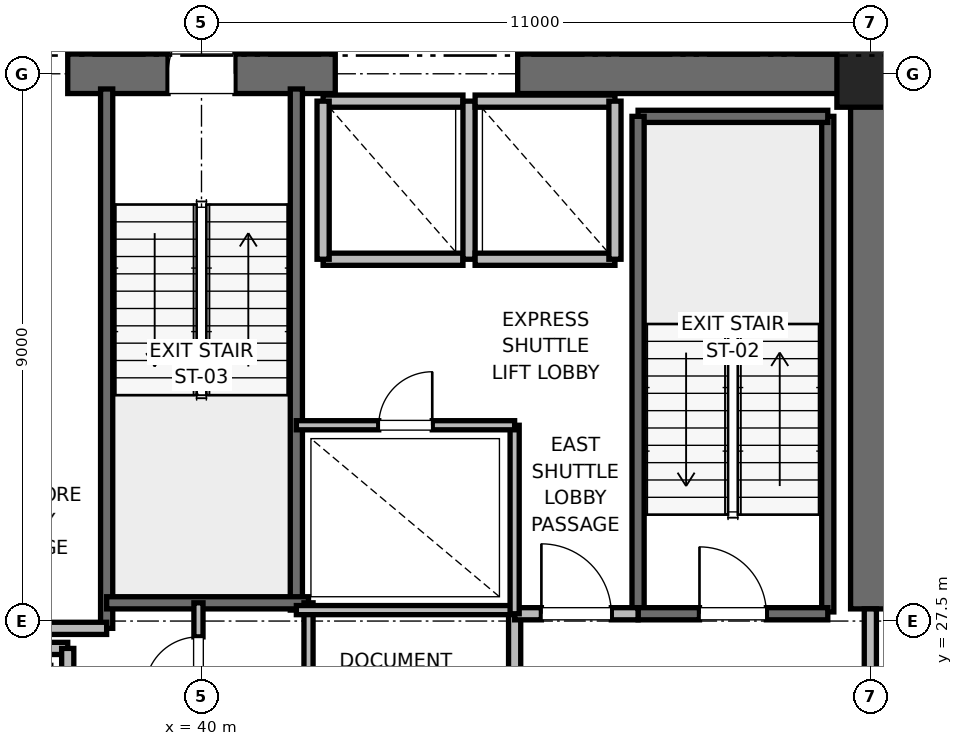
"""IFC4 building model, lengths in metres.
Left out: names, types, materials, properties, quantities, classifications, styles, units other than length and angle.
Written with IfcOpenShell. Run it as: python <this file> out.ifc"""

import sys

from ifc_helpers import new_model, si_unit, direction, frame, frame_2d, origin, origin_2d, place, context, subcontext, project, spatial, rectangle, extrude, element, fill, save


model = new_model("IFC4")
c1 = context("Model", 3, precision=1e-05, world=origin(), true_north=direction((0.0, 1.0)))
c2 = subcontext(c1, "Body", "Model", "MODEL_VIEW")
j1 = project(units=[si_unit("LENGTHUNIT", "METRE"), si_unit("PLANEANGLEUNIT", "RADIAN")], contexts=[c1])
p1 = place(None, origin())
s1 = spatial("IfcSite", under=j1, at=p1, CompositionType="ELEMENT")
p2 = place(p1, origin())
s2 = spatial("IfcBuilding", under=s1, at=p2, CompositionType="ELEMENT")
p3 = place(p2, frame((0.0, 0.0, 43.6)))
s3 = spatial("IfcBuildingStorey", under=s2, at=p3, CompositionType="ELEMENT", Elevation=43.6)
p4 = place(p3, frame((51.0, 36.5, 0.0), z_axis=(0.0, 0.0, 1.0), x_axis=(1.0, 0.0, 0.0)))
e1 = element("IfcColumn", 1, at=p4, inside=s3, PredefinedType="PILASTER", context=c2, shape_type="SweptSolid", body=[
    extrude(rectangle(XDim=1.1, YDim=1.1, at=origin_2d()), origin(), (0.0, 0.0, 1.0), 4.0),
])
p5 = place(p3, frame((37.8, 36.5, 0.0), z_axis=(0.0, 0.0, 1.0), x_axis=(1.0, 0.0, 0.0)))
e2 = element("IfcWall", 2, at=p5, inside=s3, PredefinedType="SHEAR", context=c2, shape_type="SweptSolid", body=[
    extrude(rectangle(XDim=4.4, YDim=0.65, at=frame_2d((2.2, 0.0))), origin(), (0.0, 0.0, 1.0), 3.76),
])
p6 = place(p5, frame((1.65, 0.0, 0.0)))
e3 = element("IfcOpeningElement", 3, at=p6, cuts=e2, PredefinedType="OPENING", context=c2, shape_type="SweptSolid", body=[
    extrude(rectangle(XDim=1.1, YDim=2.15, at=frame_2d((0.55, 1.075))), frame((0.0, 0.325, 0.0), z_axis=(0.0, -1.0, 0.0), x_axis=(1.0, 0.0, 0.0)), (0.0, 0.0, 1.0), 0.65),
])
p7 = place(p3, frame((45.2, 36.5, 0.0), z_axis=(0.0, 0.0, 1.0), x_axis=(1.0, 0.0, 0.0)))
e4 = element("IfcWall", 4, at=p7, inside=s3, PredefinedType="SHEAR", context=c2, shape_type="SweptSolid", body=[
    extrude(rectangle(XDim=5.8, YDim=0.65, at=frame_2d((2.9, 0.0))), origin(), (0.0, 0.0, 1.0), 3.76),
])
p8 = place(p3, frame((51.0, 27.7, 0.0), z_axis=(0.0, 0.0, 1.0), x_axis=(0.0, 1.0, 0.0)))
e5 = element("IfcWall", 5, at=p8, inside=s3, PredefinedType="SHEAR", context=c2, shape_type="SweptSolid", body=[
    extrude(rectangle(XDim=8.8, YDim=0.65, at=frame_2d((4.4, 0.0))), origin(), (0.0, 0.0, 1.0), 3.76),
])
p9 = place(p3, frame((50.3, 27.65, 0.0), z_axis=(0.0, 0.0, 1.0), x_axis=(0.0, 1.0, 0.0)))
e6 = element("IfcWall", 6, at=p9, inside=s3, PredefinedType="SOLIDWALL", context=c2, shape_type="SweptSolid", body=[
    extrude(rectangle(XDim=8.15, YDim=0.2, at=frame_2d((4.075, 0.0))), origin(), (0.0, 0.0, 1.0), 3.76),
])
p10 = place(p3, frame((47.18, 35.8, 0.0), z_axis=(0.0, 0.0, 1.0), x_axis=(1.0, 0.0, 0.0)))
e7 = element("IfcWall", 7, at=p10, inside=s3, PredefinedType="SOLIDWALL", context=c2, shape_type="SweptSolid", body=[
    extrude(rectangle(XDim=3.12, YDim=0.2, at=frame_2d((1.56, 0.0))), origin(), (0.0, 0.0, 1.0), 3.76),
])
p11 = place(p3, frame((47.18, 27.62, 0.0), z_axis=(0.0, 0.0, 1.0), x_axis=(0.0, 1.0, 0.0)))
e8 = element("IfcWall", 8, at=p11, inside=s3, PredefinedType="SOLIDWALL", context=c2, shape_type="SweptSolid", body=[
    extrude(rectangle(XDim=8.18, YDim=0.2, at=frame_2d((4.09, 0.0))), origin(), (0.0, 0.0, 1.0), 3.76),
])
p12 = place(p3, frame((47.18, 27.62, 0.0), z_axis=(0.0, 0.0, 1.0), x_axis=(1.0, 0.0, 0.0)))
e9 = element("IfcWall", 9, at=p12, inside=s3, PredefinedType="SOLIDWALL", context=c2, shape_type="SweptSolid", body=[
    extrude(rectangle(XDim=3.12, YDim=0.2, at=frame_2d((1.56, 0.0))), origin(), (0.0, 0.0, 1.0), 3.76),
])
p13 = place(p12, frame((1.01, 0.0, 0.0)))
e10 = element("IfcOpeningElement", 10, at=p13, cuts=e9, PredefinedType="OPENING", context=c2, shape_type="SweptSolid", body=[
    extrude(rectangle(XDim=1.1, YDim=2.15, at=frame_2d((0.55, 1.075))), frame((0.0, 0.1, 0.0), z_axis=(0.0, -1.0, 0.0), x_axis=(1.0, 0.0, 0.0)), (0.0, 0.0, 1.0), 0.2),
])
p14 = place(p3, frame((38.44, 27.38, 0.0), z_axis=(0.0, 0.0, 1.0), x_axis=(0.0, 1.0, 0.0)))
e11 = element("IfcWall", 11, at=p14, inside=s3, PredefinedType="SOLIDWALL", context=c2, shape_type="SweptSolid", body=[
    extrude(rectangle(XDim=8.87, YDim=0.2, at=frame_2d((4.435, 0.0))), origin(), (0.0, 0.0, 1.0), 3.76),
])
p15 = place(p3, frame((41.56, 27.68, 0.0), z_axis=(0.0, 0.0, 1.0), x_axis=(0.0, 1.0, 0.0)))
e12 = element("IfcWall", 12, at=p15, inside=s3, PredefinedType="SOLIDWALL", context=c2, shape_type="SweptSolid", body=[
    extrude(rectangle(XDim=8.57, YDim=0.2, at=frame_2d((4.285, 0.0))), origin(), (0.0, 0.0, 1.0), 3.76),
])
p16 = place(p3, frame((38.44, 27.8, 0.0), z_axis=(0.0, 0.0, 1.0), x_axis=(1.0, 0.0, 0.0)))
e13 = element("IfcWall", 13, at=p16, inside=s3, PredefinedType="SOLIDWALL", context=c2, shape_type="SweptSolid", body=[
    extrude(rectangle(XDim=3.32, YDim=0.2, at=frame_2d((1.66, 0.0))), origin(), (0.0, 0.0, 1.0), 3.76),
])
p17 = place(p3, frame((32.82, 27.38, 0.0), z_axis=(0.0, 0.0, 1.0), x_axis=(1.0, 0.0, 0.0)))
e14 = element("IfcWall", 14, at=p17, inside=s3, PredefinedType="PARTITIONING", context=c2, shape_type="SweptSolid", body=[
    extrude(rectangle(XDim=5.62, YDim=0.2, at=frame_2d((2.81, 0.0))), origin(), (0.0, 0.0, 1.0), 3.76),
])
p18 = place(p3, frame((45.15, 24.25, 0.0), z_axis=(0.0, 0.0, 1.0), x_axis=(0.0, 1.0, 0.0)))
e15 = element("IfcWall", 15, at=p18, inside=s3, PredefinedType="PARTITIONING", context=c2, shape_type="SweptSolid", body=[
    extrude(rectangle(XDim=3.37, YDim=0.2, at=frame_2d((1.685, 0.0))), origin(), (0.0, 0.0, 1.0), 3.76),
])
p19 = place(p3, frame((45.15, 27.62, 0.0), z_axis=(0.0, 0.0, 1.0), x_axis=(1.0, 0.0, 0.0)))
e16 = element("IfcWall", 16, at=p19, inside=s3, PredefinedType="PARTITIONING", context=c2, shape_type="SweptSolid", body=[
    extrude(rectangle(XDim=2.03, YDim=0.2, at=frame_2d((1.015, 0.0))), origin(), (0.0, 0.0, 1.0), 3.76),
])
p20 = place(p19, frame((0.44, 0.0, 0.0)))
e17 = element("IfcOpeningElement", 17, at=p20, cuts=e16, PredefinedType="OPENING", context=c2, shape_type="SweptSolid", body=[
    extrude(rectangle(XDim=1.15, YDim=2.2, at=frame_2d((0.575, 1.1))), frame((0.0, 0.1, 0.0), z_axis=(0.0, -1.0, 0.0), x_axis=(1.0, 0.0, 0.0)), (0.0, 0.0, 1.0), 0.2),
])
p21 = place(p3, frame((51.0, 24.3, 0.0), z_axis=(0.0, 0.0, 1.0), x_axis=(0.0, 1.0, 0.0)))
e18 = element("IfcWall", 18, at=p21, inside=s3, PredefinedType="PARTITIONING", context=c2, shape_type="SweptSolid", body=[
    extrude(rectangle(XDim=3.4, YDim=0.2, at=frame_2d((1.7, 0.0))), origin(), (0.0, 0.0, 1.0), 2.54),
])
p22 = place(p21, frame((1.125, 0.0, 0.0)))
e19 = element("IfcOpeningElement", 19, at=p22, cuts=e18, PredefinedType="OPENING", context=c2, shape_type="SweptSolid", body=[
    extrude(rectangle(XDim=1.15, YDim=2.2, at=frame_2d((0.575, 1.1))), frame((0.0, 0.1, 0.0), z_axis=(0.0, -1.0, 0.0), x_axis=(1.0, 0.0, 0.0)), (0.0, 0.0, 1.0), 0.2),
])
p23 = place(p3, frame((37.8, 27.05, 0.0), z_axis=(0.0, 0.0, 1.0), x_axis=(-1.0, 0.0, 0.0)))
e20 = element("IfcWall", 20, at=p23, inside=s3, PredefinedType="SOLIDWALL", context=c2, shape_type="SweptSolid", body=[
    extrude(rectangle(XDim=2.3, YDim=0.2, at=frame_2d((1.15, 0.0))), origin(), (0.0, 0.0, 1.0), 3.76),
])
p24 = place(p3, frame((37.8, 24.45, 0.0), z_axis=(0.0, 0.0, 1.0), x_axis=(0.0, 1.0, 0.0)))
e21 = element("IfcWall", 21, at=p24, inside=s3, PredefinedType="SOLIDWALL", context=c2, shape_type="SweptSolid", body=[
    extrude(rectangle(XDim=2.6, YDim=0.2, at=frame_2d((1.3, 0.0))), origin(), (0.0, 0.0, 1.0), 3.76),
])
p25 = place(p3, frame((42.0, 33.45, 0.0), z_axis=(0.0, 0.0, 1.0), x_axis=(1.0, 0.0, 0.0)))
e22 = element("IfcWall", 22, at=p25, inside=s3, PredefinedType="SOLIDWALL", context=c2, shape_type="SweptSolid", body=[
    extrude(rectangle(XDim=2.3, YDim=0.2, at=frame_2d((1.15, 0.0))), origin(), (0.0, 0.0, 1.0), 3.76),
])
p26 = place(p3, frame((44.3, 36.05, 0.0), z_axis=(0.0, 0.0, 1.0), x_axis=(-1.0, 0.0, 0.0)))
e23 = element("IfcWall", 23, at=p26, inside=s3, PredefinedType="SOLIDWALL", context=c2, shape_type="SweptSolid", body=[
    extrude(rectangle(XDim=2.3, YDim=0.2, at=frame_2d((1.15, 0.0))), origin(), (0.0, 0.0, 1.0), 2.54),
])
for number, where, z_axis, x_axis in (
    (24, (42.0, 36.05, 0.0), (0.0, 0.0, 1.0), (0.0, -1.0, 0.0)),
    (25, (44.4, 33.45, 0.0), (0.0, 0.0, 1.0), (0.0, 1.0, 0.0)),
):
    element("IfcWall", number, at=place(p3, frame(where, z_axis=z_axis, x_axis=x_axis)), inside=s3, PredefinedType="SOLIDWALL", context=c2, shape_type="SweptSolid", body=[
        extrude(rectangle(XDim=2.6, YDim=0.2, at=frame_2d((1.3, 0.0))), origin(), (0.0, 0.0, 1.0), 2.54),
    ])
p27 = place(p3, frame((44.5, 33.45, 0.0), z_axis=(0.0, 0.0, 1.0), x_axis=(1.0, 0.0, 0.0)))
e26 = element("IfcWall", 26, at=p27, inside=s3, PredefinedType="SOLIDWALL", context=c2, shape_type="SweptSolid", body=[
    extrude(rectangle(XDim=2.3, YDim=0.2, at=frame_2d((1.15, 0.0))), origin(), (0.0, 0.0, 1.0), 3.76),
])
p28 = place(p3, frame((46.8, 36.05, 0.0), z_axis=(0.0, 0.0, 1.0), x_axis=(-1.0, 0.0, 0.0)))
e27 = element("IfcWall", 27, at=p28, inside=s3, PredefinedType="SOLIDWALL", context=c2, shape_type="SweptSolid", body=[
    extrude(rectangle(XDim=2.3, YDim=0.2, at=frame_2d((1.15, 0.0))), origin(), (0.0, 0.0, 1.0), 2.54),
])
p29 = place(p3, frame((46.8, 33.45, 0.0), z_axis=(0.0, 0.0, 1.0), x_axis=(0.0, 1.0, 0.0)))
e28 = element("IfcWall", 28, at=p29, inside=s3, PredefinedType="SOLIDWALL", context=c2, shape_type="SweptSolid", body=[
    extrude(rectangle(XDim=2.6, YDim=0.2, at=frame_2d((1.3, 0.0))), origin(), (0.0, 0.0, 1.0), 3.76),
])
p30 = place(p3, frame((41.76, 23.8, 0.0), z_axis=(0.0, 0.0, 1.0), x_axis=(0.0, 1.0, 0.0)))
e29 = element("IfcWall", 29, at=p30, inside=s3, PredefinedType="PARTITIONING", context=c2, shape_type="SweptSolid", body=[
    extrude(rectangle(XDim=4.0, YDim=0.15, at=frame_2d((2.0, 0.0))), origin(), (0.0, 0.0, 1.0), 2.85),
])
p31 = place(p3, frame((39.95, 25.8, 0.0), z_axis=(0.0, 0.0, 1.0), x_axis=(0.0, 1.0, 0.0)))
e30 = element("IfcWall", 30, at=p31, inside=s3, PredefinedType="PARTITIONING", context=c2, shape_type="SweptSolid", body=[
    extrude(rectangle(XDim=2.0, YDim=0.15, at=frame_2d((1.0, 0.0))), origin(), (0.0, 0.0, 1.0), 2.85),
])
p32 = place(p31, frame((0.56, 0.0, 0.0)))
e31 = element("IfcOpeningElement", 31, at=p32, cuts=e30, PredefinedType="OPENING", context=c2, shape_type="SweptSolid", body=[
    extrude(rectangle(XDim=0.88, YDim=2.1, at=frame_2d((0.44, 1.05))), frame((0.0, 0.075, 0.0), z_axis=(0.0, -1.0, 0.0), x_axis=(1.0, 0.0, 0.0)), (0.0, 0.0, 1.0), 0.15),
])
p33 = place(p3, frame((41.56, 27.68, 0.0), z_axis=(0.0, 0.0, 1.0), x_axis=(1.0, 0.0, 0.0)))
e32 = element("IfcWall", 32, at=p33, inside=s3, PredefinedType="PARTITIONING", context=c2, shape_type="SweptSolid", body=[
    extrude(rectangle(XDim=3.59, YDim=0.15, at=frame_2d((1.795, 0.0))), origin(), (0.0, 0.0, 1.0), 2.85),
])
p34 = place(p3, frame((45.15, 27.62, 0.0), z_axis=(0.0, 0.0, 1.0), x_axis=(0.0, 1.0, 0.0)))
e33 = element("IfcWall", 33, at=p34, inside=s3, PredefinedType="PARTITIONING", context=c2, shape_type="SweptSolid", body=[
    extrude(rectangle(XDim=3.1, YDim=0.15, at=frame_2d((1.55, 0.0))), origin(), (0.0, 0.0, 1.0), 2.85),
])
p35 = place(p3, frame((41.56, 30.72, 0.0), z_axis=(0.0, 0.0, 1.0), x_axis=(1.0, 0.0, 0.0)))
e34 = element("IfcWall", 34, at=p35, inside=s3, PredefinedType="PARTITIONING", context=c2, shape_type="SweptSolid", body=[
    extrude(rectangle(XDim=3.59, YDim=0.15, at=frame_2d((1.795, 0.0))), origin(), (0.0, 0.0, 1.0), 2.85),
])
p36 = place(p35, frame((1.355, 0.0, 0.0)))
e35 = element("IfcOpeningElement", 35, at=p36, cuts=e34, PredefinedType="OPENING", context=c2, shape_type="SweptSolid", body=[
    extrude(rectangle(XDim=0.88, YDim=2.1, at=frame_2d((0.44, 1.05))), frame((0.0, 0.075, 0.0), z_axis=(0.0, -1.0, 0.0), x_axis=(1.0, 0.0, 0.0)), (0.0, 0.0, 1.0), 0.15),
])
p37 = place(p13, origin())
e36 = element("IfcDoor", 36, at=p37, inside=s3, OperationType="SINGLE_SWING_LEFT", PredefinedType="DOOR", context=c2, shape_type="SweptSolid", body=[
    extrude(rectangle(XDim=1.1, YDim=2.15, at=frame_2d((0.55, 1.075))), frame((0.0, 0.025, 0.0), z_axis=(0.0, -1.0, 0.0), x_axis=(1.0, 0.0, 0.0)), (0.0, 0.0, 1.0), 0.05),
])
fill(e10, e36)
p38 = place(p6, origin())
e37 = element("IfcDoor", 37, at=p38, inside=s3, OperationType="SINGLE_SWING_RIGHT", PredefinedType="DOOR", context=c2, shape_type="SweptSolid", body=[
    extrude(rectangle(XDim=1.1, YDim=2.15, at=frame_2d((0.55, 1.075))), frame((0.0, 0.025, 0.0), z_axis=(0.0, -1.0, 0.0), x_axis=(1.0, 0.0, 0.0)), (0.0, 0.0, 1.0), 0.05),
])
fill(e3, e37)
p39 = place(p20, origin())
e38 = element("IfcDoor", 38, at=p39, inside=s3, OperationType="SINGLE_SWING_LEFT", PredefinedType="DOOR", context=c2, shape_type="SweptSolid", body=[
    extrude(rectangle(XDim=1.15, YDim=2.2, at=frame_2d((0.575, 1.1))), frame((0.0, 0.025, 0.0), z_axis=(0.0, -1.0, 0.0), x_axis=(1.0, 0.0, 0.0)), (0.0, 0.0, 1.0), 0.05),
])
fill(e17, e38)
p40 = place(p32, origin())
e39 = element("IfcDoor", 39, at=p40, inside=s3, OperationType="SINGLE_SWING_LEFT", PredefinedType="DOOR", context=c2, shape_type="SweptSolid", body=[
    extrude(rectangle(XDim=0.88, YDim=2.1, at=frame_2d((0.44, 1.05))), frame((0.0, 0.025, 0.0), z_axis=(0.0, -1.0, 0.0), x_axis=(1.0, 0.0, 0.0)), (0.0, 0.0, 1.0), 0.05),
])
fill(e31, e39)
p41 = place(p36, origin())
e40 = element("IfcDoor", 40, at=p41, inside=s3, OperationType="SINGLE_SWING_RIGHT", PredefinedType="DOOR", context=c2, shape_type="SweptSolid", body=[
    extrude(rectangle(XDim=0.88, YDim=2.1, at=frame_2d((0.44, 1.05))), frame((0.0, 0.025, 0.0), z_axis=(0.0, -1.0, 0.0), x_axis=(1.0, 0.0, 0.0)), (0.0, 0.0, 1.0), 0.05),
])
fill(e35, e40)
save(model, sys.argv[1])
